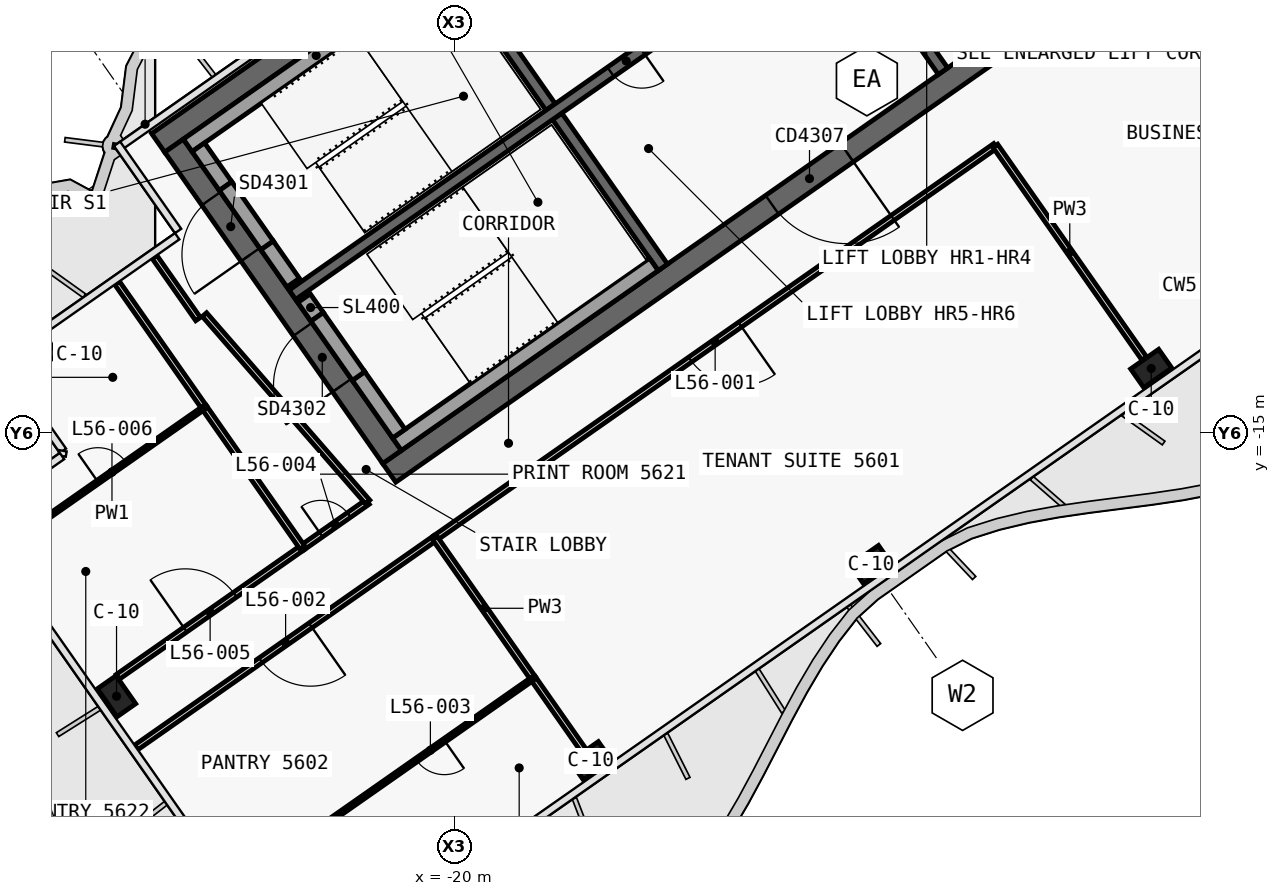
"""IFC4 building model, lengths in metres.
Left out: names, types, materials, properties, quantities, classifications, styles, units other than length and angle.
Written with IfcOpenShell. Run it as: python <this file> out.ifc"""

import sys

from ifc_helpers import new_model, si_unit, direction, frame, frame_2d, origin, origin_2d, place, context, subcontext, project, spatial, polyline, rectangle, outline, extrude, element, fill, save


model = new_model("IFC4")
c1 = context("Model", 3, precision=1e-05, world=origin(), true_north=direction((0.0, 1.0)))
c2 = subcontext(c1, "Body", "Model", "MODEL_VIEW")
j1 = project(units=[si_unit("LENGTHUNIT", "METRE"), si_unit("PLANEANGLEUNIT", "RADIAN")], contexts=[c1])
p1 = place(None, origin())
s1 = spatial("IfcSite", under=j1, at=p1, CompositionType="ELEMENT")
p2 = place(p1, origin())
s2 = spatial("IfcBuilding", under=s1, at=p2, CompositionType="ELEMENT")
p3 = place(p2, frame((0.0, 0.0, 241.0)))
s3 = spatial("IfcBuildingStorey", under=s2, at=p3, CompositionType="ELEMENT", Elevation=241.0)
p4 = place(p3, frame((-0.028, 12.066, 0.0), z_axis=(0.0, 0.0, 1.0), x_axis=(-0.819151382952, -0.573577380837, 0.0)))
e1 = element("IfcWall", 1, at=p4, inside=s3, PredefinedType="SHEAR", context=c2, shape_type="SweptSolid", body=[
    extrude(outline(polyline([(33.898, 0.3), (0.42, 0.3), (0.0, -0.3), (33.898, -0.3), (33.898, 0.3)])), origin(), (0.0, 0.0, 1.0), 3.9),
])
p5 = place(p3, frame((-0.028, -0.874, 0.0), z_axis=(0.0, 0.0, 1.0), x_axis=(-0.819150035022, -0.573579305871, 0.0)))
e2 = element("IfcWall", 2, at=p5, inside=s3, PredefinedType="SHEAR", context=c2, shape_type="SweptSolid", body=[
    extrude(outline(polyline([(26.476, 0.3), (0.42, 0.3), (0.0, -0.3), (26.476, -0.3), (26.476, 0.3)])), origin(), (0.0, 0.0, 1.0), 3.9),
])
p6 = place(p5, frame((2.976, 0.0, 0.0)))
e3 = element("IfcOpeningElement", 3, at=p6, cuts=e2, PredefinedType="OPENING", context=c2, shape_type="SweptSolid", body=[
    extrude(rectangle(XDim=2.4, YDim=2.1, at=frame_2d((1.2, 1.05))), frame((0.0, 0.31, 0.0), z_axis=(0.0, -1.0, 0.0), x_axis=(1.0, 0.0, 0.0)), (0.0, 0.0, 1.0), 0.62),
])
p7 = place(p5, frame((11.776, 0.0, 0.0)))
e4 = element("IfcOpeningElement", 4, at=p7, cuts=e2, PredefinedType="OPENING", context=c2, shape_type="SweptSolid", body=[
    extrude(rectangle(XDim=2.4, YDim=2.1, at=frame_2d((1.2, 1.05))), frame((0.0, 0.31, 0.0), z_axis=(0.0, -1.0, 0.0), x_axis=(1.0, 0.0, 0.0)), (0.0, 0.0, 1.0), 0.62),
])
p8 = place(p3, frame((-21.642, -15.642, 0.0), z_axis=(0.0, 0.0, 1.0), x_axis=(-0.573586866468, 0.819144740944, 0.0)))
e5 = element("IfcWall", 5, at=p8, inside=s3, PredefinedType="SHEAR", context=c2, shape_type="SweptSolid", body=[
    extrude(outline(polyline([(0.0, 0.3), (0.0, -0.3), (10.0, -0.3), (10.0, 0.3), (0.0, 0.3)])), origin(), (0.0, 0.0, 1.0), 3.9),
])
p9 = place(p8, frame((6.5, 0.0, 0.0)))
e6 = element("IfcOpeningElement", 6, at=p9, cuts=e5, PredefinedType="OPENING", context=c2, shape_type="SweptSolid", body=[
    extrude(rectangle(XDim=1.8, YDim=2.1, at=frame_2d((0.9, 1.05))), frame((0.0, 0.31, 0.0), z_axis=(0.0, -1.0, 0.0), x_axis=(1.0, 0.0, 0.0)), (0.0, 0.0, 1.0), 0.62),
])
p10 = place(p8, frame((2.3, 0.0, 0.0)))
e7 = element("IfcOpeningElement", 7, at=p10, cuts=e5, PredefinedType="OPENING", context=c2, shape_type="SweptSolid", body=[
    extrude(rectangle(XDim=1.8, YDim=2.1, at=frame_2d((0.9, 1.05))), frame((0.0, 0.31, 0.0), z_axis=(0.0, -1.0, 0.0), x_axis=(1.0, 0.0, 0.0)), (0.0, 0.0, 1.0), 0.62),
])
p11 = place(p3, frame((-7.143, -5.49, 0.0), z_axis=(0.0, 0.0, 1.0), x_axis=(-0.573617744349, 0.819123118565, 0.0)))
e8 = element("IfcWall", 8, at=p11, inside=s3, PredefinedType="SHEAR", context=c2, shape_type="SweptSolid", body=[
    extrude(outline(polyline([(4.85, 0.15), (0.0, 0.15), (0.0, -0.15), (4.85, -0.15), (4.85, 0.15)])), origin(), (0.0, 0.0, 1.0), 3.9),
])
p12 = place(p3, frame((-14.515, -10.652, 0.0), z_axis=(0.0, 0.0, 1.0), x_axis=(-0.573560315113, 0.819163332265, 0.0)))
e9 = element("IfcWall", 9, at=p12, inside=s3, PredefinedType="SHEAR", context=c2, shape_type="SweptSolid", body=[
    extrude(outline(polyline([(4.85, 0.15), (0.0, 0.15), (0.0, -0.15), (4.85, -0.15), (4.85, 0.15)])), origin(), (0.0, 0.0, 1.0), 3.9),
])
p13 = place(p3, frame((-17.469, -6.433, 0.0), z_axis=(0.0, 0.0, 1.0), x_axis=(-0.573594092424, 0.81913968109, 0.0)))
e10 = element("IfcWall", 10, at=p13, inside=s3, PredefinedType="SHEAR", context=c2, shape_type="SweptSolid", body=[
    extrude(outline(polyline([(4.85, -0.15), (4.85, 0.15), (0.0, 0.15), (0.0, -0.15), (4.85, -0.15)])), origin(), (0.0, 0.0, 1.0), 3.9),
])
p14 = place(p3, frame((-2.638, 3.768, 0.0), z_axis=(0.0, 0.0, 1.0), x_axis=(-0.819155014212, -0.573572194837, 0.0)))
e11 = element("IfcWall", 11, at=p14, inside=s3, PredefinedType="SHEAR", context=c2, shape_type="SweptSolid", body=[
    extrude(outline(polyline([(26.4, 0.15), (0.0, 0.15), (0.0, -0.15), (26.4, -0.15), (26.4, 0.15)])), origin(), (0.0, 0.0, 1.0), 3.9),
])
p15 = place(p14, frame((1.169, 0.0, 0.0)))
e12 = element("IfcOpeningElement", 12, at=p15, cuts=e11, PredefinedType="OPENING", context=c2, shape_type="SweptSolid", body=[
    extrude(rectangle(XDim=1.1, YDim=2.1, at=frame_2d((0.55, 1.05))), frame((0.0, 0.16, 0.0), z_axis=(0.0, -1.0, 0.0), x_axis=(1.0, 0.0, 0.0)), (0.0, 0.0, 1.0), 0.32),
])
p16 = place(p14, frame((3.206, 0.0, 0.0)))
e13 = element("IfcOpeningElement", 13, at=p16, cuts=e11, PredefinedType="OPENING", context=c2, shape_type="SweptSolid", body=[
    extrude(rectangle(XDim=1.1, YDim=2.1, at=frame_2d((0.55, 1.05))), frame((0.0, 0.16, 0.0), z_axis=(0.0, -1.0, 0.0), x_axis=(1.0, 0.0, 0.0)), (0.0, 0.0, 1.0), 0.32),
])
p17 = place(p14, frame((5.244, 0.0, 0.0)))
e14 = element("IfcOpeningElement", 14, at=p17, cuts=e11, PredefinedType="OPENING", context=c2, shape_type="SweptSolid", body=[
    extrude(rectangle(XDim=1.1, YDim=2.1, at=frame_2d((0.55, 1.05))), frame((0.0, 0.16, 0.0), z_axis=(0.0, -1.0, 0.0), x_axis=(1.0, 0.0, 0.0)), (0.0, 0.0, 1.0), 0.32),
])
p18 = place(p14, frame((7.281, 0.0, 0.0)))
e15 = element("IfcOpeningElement", 15, at=p18, cuts=e11, PredefinedType="OPENING", context=c2, shape_type="SweptSolid", body=[
    extrude(rectangle(XDim=1.1, YDim=2.1, at=frame_2d((0.55, 1.05))), frame((0.0, 0.16, 0.0), z_axis=(0.0, -1.0, 0.0), x_axis=(1.0, 0.0, 0.0)), (0.0, 0.0, 1.0), 0.32),
])
p19 = place(p14, frame((9.688, 0.0, 0.0)))
e16 = element("IfcOpeningElement", 16, at=p19, cuts=e11, PredefinedType="OPENING", context=c2, shape_type="SweptSolid", body=[
    extrude(rectangle(XDim=1.1, YDim=2.1, at=frame_2d((0.55, 1.05))), frame((0.0, 0.16, 0.0), z_axis=(0.0, -1.0, 0.0), x_axis=(1.0, 0.0, 0.0)), (0.0, 0.0, 1.0), 0.32),
])
p20 = place(p14, frame((11.863, 0.0, 0.0)))
e17 = element("IfcOpeningElement", 17, at=p20, cuts=e11, PredefinedType="OPENING", context=c2, shape_type="SweptSolid", body=[
    extrude(rectangle(XDim=1.1, YDim=2.1, at=frame_2d((0.55, 1.05))), frame((0.0, 0.16, 0.0), z_axis=(0.0, -1.0, 0.0), x_axis=(1.0, 0.0, 0.0)), (0.0, 0.0, 1.0), 0.32),
])
p21 = place(p14, frame((15.175, 0.0, 0.0)))
e18 = element("IfcOpeningElement", 18, at=p21, cuts=e11, PredefinedType="OPENING", context=c2, shape_type="SweptSolid", body=[
    extrude(rectangle(XDim=1.0, YDim=2.1, at=frame_2d((0.5, 1.05))), frame((0.0, 0.16, 0.0), z_axis=(0.0, -1.0, 0.0), x_axis=(1.0, 0.0, 0.0)), (0.0, 0.0, 1.0), 0.32),
])
for number, where, z_axis, x_axis in (
    (19, (-1.665, -13.313, 0.0), (0.0, 0.0, 1.0), (-0.819, -0.574, 0.0)),
    (20, (-9.038, -18.475, 0.0), (0.0, 0.0, 1.0), (-0.819, -0.574, 0.0)),
    (21, (-16.41, -23.637, 0.0), (0.0, 0.0, 1.0), (-0.819, -0.574, 0.0)),
    (22, (-30.969, -12.956, 0.0), (0.0, 0.0, 1.0), (-0.819, -0.574, 0.0)),
    (23, (-28.891, -21.939, 0.0), (0.0, 0.0, 1.0), (-0.574, 0.819, 0.0)),
):
    element("IfcColumn", number, at=place(p3, frame(where, z_axis=z_axis, x_axis=x_axis)), inside=s3, PredefinedType="COLUMN", context=c2, shape_type="SweptSolid", body=[
        extrude(rectangle(XDim=0.9, YDim=0.6, at=origin_2d()), origin(), (0.0, 0.0, 1.0), 3.9),
    ])
p22 = place(p3, frame((-20.259, -2.71, 0.0), z_axis=(0.0, 0.0, 1.0), x_axis=(-0.81914849389, -0.573581506813, 0.0)))
e24 = element("IfcWall", 24, at=p22, inside=s3, PredefinedType="SOLIDWALL", context=c2, shape_type="SweptSolid", body=[
    extrude(rectangle(XDim=8.25, YDim=0.4, at=frame_2d((4.125, 0.0))), origin(), (0.0, 0.0, 1.0), 3.62),
])
p23 = place(p3, frame((-24.244, -11.055, 0.0), z_axis=(0.0, 0.0, 1.0), x_axis=(-0.573571582932, 0.819155442668, 0.0)))
e25 = element("IfcWall", 25, at=p23, inside=s3, PredefinedType="SOLIDWALL", context=c2, shape_type="SweptSolid", body=[
    extrude(rectangle(XDim=1.2, YDim=0.4, at=frame_2d((0.6, 0.0))), origin(), (0.0, 0.0, 1.0), 3.62),
])
p24 = place(p3, frame((-26.022, -8.515, 0.0), z_axis=(0.0, 0.0, 1.0), x_axis=(-0.573619628835, 0.819121798889, 0.0)))
e26 = element("IfcWall", 26, at=p24, inside=s3, PredefinedType="SOLIDWALL", context=c2, shape_type="SweptSolid", body=[
    extrude(rectangle(XDim=1.25, YDim=0.4, at=frame_2d((0.625, 0.0))), origin(), (0.0, 0.0, 1.0), 3.62),
])
p25 = place(p3, frame((-24.932, -10.072, 2.15), z_axis=(0.0, 0.0, 1.0), x_axis=(-0.573591692345, 0.819141361715, 0.0)))
e27 = element("IfcWall", 27, at=p25, inside=s3, PredefinedType="SOLIDWALL", context=c2, shape_type="SweptSolid", body=[
    extrude(rectangle(XDim=1.9, YDim=0.4, at=frame_2d((0.95, 0.0))), origin(), (0.0, 0.0, 1.0), 1.47),
])
p26 = place(p3, frame((-14.753, -10.574, 0.0), z_axis=(0.0, 0.0, 1.0), x_axis=(-0.819158229677, -0.573567602601, 0.0)))
e28 = element("IfcWall", 28, at=p26, inside=s3, PredefinedType="SOLIDWALL", context=c2, shape_type="SweptSolid", body=[
    extrude(rectangle(XDim=8.25, YDim=0.4, at=frame_2d((4.125, 0.0))), origin(), (0.0, 0.0, 1.0), 3.62),
])
p27 = place(p3, frame((-21.462, -15.028, 0.0), z_axis=(0.0, 0.0, 1.0), x_axis=(-0.573559770908, 0.819163713305, 0.0)))
e29 = element("IfcWall", 29, at=p27, inside=s3, PredefinedType="SOLIDWALL", context=c2, shape_type="SweptSolid", body=[
    extrude(rectangle(XDim=1.85, YDim=0.4, at=frame_2d((0.925, 0.0))), origin(), (0.0, 0.0, 1.0), 3.62),
])
p28 = place(p3, frame((-23.613, -11.956, 0.0), z_axis=(0.0, 0.0, 1.0), x_axis=(-0.573435029941, 0.819251039936, 0.0)))
e30 = element("IfcWall", 30, at=p28, inside=s3, PredefinedType="SOLIDWALL", context=c2, shape_type="SweptSolid", body=[
    extrude(rectangle(XDim=0.6, YDim=0.4, at=frame_2d((0.3, 0.0))), origin(), (0.0, 0.0, 1.0), 3.62),
])
p29 = place(p3, frame((-22.523, -13.512, 2.15), z_axis=(0.0, 0.0, 1.0), x_axis=(-0.573591692345, 0.819141361715, 0.0)))
e31 = element("IfcWall", 31, at=p29, inside=s3, PredefinedType="SOLIDWALL", context=c2, shape_type="SweptSolid", body=[
    extrude(rectangle(XDim=1.9, YDim=0.4, at=frame_2d((0.95, 0.0))), origin(), (0.0, 0.0, 1.0), 1.47),
])
p30 = place(p3, frame((-24.002, -18.028, 0.0), z_axis=(0.0, 0.0, 1.0), x_axis=(0.819144473797, 0.573587247982, 0.0)))
e32 = element("IfcWall", 32, at=p30, inside=s3, PredefinedType="PARTITIONING", context=c2, shape_type="SweptSolid", body=[
    extrude(rectangle(XDim=2.099, YDim=0.15, at=frame_2d((1.049, 0.0))), origin(), (0.0, 0.0, 1.0), 3.62),
])
p31 = place(p30, frame((0.599, 0.0, 0.0)))
e33 = element("IfcOpeningElement", 33, at=p31, cuts=e32, PredefinedType="OPENING", context=c2, shape_type="SweptSolid", body=[
    extrude(rectangle(XDim=0.9, YDim=2.1, at=frame_2d((0.45, 1.05))), frame((0.0, 0.085, 0.0), z_axis=(0.0, -1.0, 0.0), x_axis=(1.0, 0.0, 0.0)), (0.0, 0.0, 1.0), 0.17),
])
p32 = place(p3, frame((-28.858, -21.428, 0.0), z_axis=(0.0, 0.0, 1.0), x_axis=(0.819137166599, 0.573597683308, 0.0)))
e34 = element("IfcWall", 34, at=p32, inside=s3, PredefinedType="PARTITIONING", context=c2, shape_type="SweptSolid", body=[
    extrude(rectangle(XDim=5.932, YDim=0.15, at=frame_2d((2.966, 0.0))), origin(), (0.0, 0.0, 1.0), 3.05),
])
p33 = place(p32, frame((2.166, 0.0, 0.0)))
e35 = element("IfcOpeningElement", 35, at=p33, cuts=e34, PredefinedType="OPENING", context=c2, shape_type="SweptSolid", body=[
    extrude(rectangle(XDim=1.6, YDim=2.1, at=frame_2d((0.8, 1.05))), frame((0.0, 0.085, 0.0), z_axis=(0.0, -1.0, 0.0), x_axis=(1.0, 0.0, 0.0)), (0.0, 0.0, 1.0), 0.17),
])
p34 = place(p3, frame((-5.766, -7.456, 0.0), z_axis=(0.0, 0.0, 1.0), x_axis=(-0.819153544995, -0.573574293115, 0.0)))
e36 = element("IfcWall", 36, at=p34, inside=s3, PredefinedType="PARTITIONING", context=c2, shape_type="SweptSolid", body=[
    extrude(rectangle(XDim=18.002, YDim=0.15, at=frame_2d((9.001, 0.0))), origin(), (0.0, 0.0, 1.0), 3.05),
])
p35 = place(p34, frame((8.201, 0.0, 0.0)))
e37 = element("IfcOpeningElement", 37, at=p35, cuts=e36, PredefinedType="OPENING", context=c2, shape_type="SweptSolid", body=[
    extrude(rectangle(XDim=1.6, YDim=2.1, at=frame_2d((0.8, 1.05))), frame((0.0, 0.085, 0.0), z_axis=(0.0, -1.0, 0.0), x_axis=(1.0, 0.0, 0.0)), (0.0, 0.0, 1.0), 0.17),
])
p36 = place(p3, frame((-20.51, -17.779, 0.0), z_axis=(0.0, 0.0, 1.0), x_axis=(-0.819147101588, -0.573583495196, 0.0)))
e38 = element("IfcWall", 38, at=p36, inside=s3, PredefinedType="PARTITIONING", context=c2, shape_type="SweptSolid", body=[
    extrude(rectangle(XDim=9.602, YDim=0.15, at=frame_2d((4.801, 0.0))), origin(), (0.0, 0.0, 1.0), 3.0),
])
p37 = place(p36, frame((4.001, 0.0, 0.0)))
e39 = element("IfcOpeningElement", 39, at=p37, cuts=e38, PredefinedType="OPENING", context=c2, shape_type="SweptSolid", body=[
    extrude(rectangle(XDim=1.6, YDim=2.1, at=frame_2d((0.8, 1.05))), frame((0.0, 0.085, 0.0), z_axis=(0.0, -1.0, 0.0), x_axis=(1.0, 0.0, 0.0)), (0.0, 0.0, 1.0), 0.17),
])
p38 = place(p3, frame((-1.849, -13.051, 0.0), z_axis=(0.0, 0.0, 1.0), x_axis=(-0.57357985571, 0.819149650018, 0.0)))
e40 = element("IfcWall", 40, at=p38, inside=s3, PredefinedType="PARTITIONING", context=c2, shape_type="SweptSolid", body=[
    extrude(rectangle(XDim=6.832, YDim=0.15, at=frame_2d((3.416, 0.0))), origin(), (0.0, 0.0, 1.0), 3.05),
])
p39 = place(p3, frame((-26.746, -12.014, 0.0), z_axis=(0.0, 0.0, 1.0), x_axis=(-0.573568836472, 0.819157365729, 0.0)))
e41 = element("IfcWall", 41, at=p39, inside=s3, PredefinedType="PARTITIONING", context=c2, shape_type="SweptSolid", body=[
    extrude(rectangle(XDim=2.0, YDim=0.15, at=frame_2d((1.0, 0.0))), origin(), (0.0, 0.0, 1.0), 3.05),
])
p40 = place(p3, frame((-22.284, -16.826, 0.0), z_axis=(0.0, 0.0, 1.0), x_axis=(-0.656758142177, 0.754101281449, 0.0)))
e42 = element("IfcWall", 42, at=p40, inside=s3, PredefinedType="PARTITIONING", context=c2, shape_type="SweptSolid", body=[
    extrude(rectangle(XDim=6.539, YDim=0.15, at=frame_2d((3.269, 0.0))), origin(), (0.0, 0.0, 1.0), 3.62),
])
p41 = place(p3, frame((-26.582, -14.341, 0.0), z_axis=(0.0, 0.0, 1.0), x_axis=(-0.573593387921, 0.81914017441, 0.0)))
e43 = element("IfcWall", 43, at=p41, inside=s3, PredefinedType="PARTITIONING", context=c2, shape_type="SweptSolid", body=[
    extrude(rectangle(XDim=4.001, YDim=0.15, at=frame_2d((2.0, 0.0))), origin(), (0.0, 0.0, 1.0), 3.05),
])
p42 = place(p3, frame((-24.001, -18.026, 0.0), z_axis=(0.0, 0.0, 1.0), x_axis=(-0.573589723117, 0.819142740634, 0.0)))
e44 = element("IfcWall", 44, at=p42, inside=s3, PredefinedType="PARTITIONING", context=c2, shape_type="SweptSolid", body=[
    extrude(rectangle(XDim=4.502, YDim=0.15, at=frame_2d((2.251, 0.0))), origin(), (0.0, 0.0, 1.0), 3.62),
])
p43 = place(p3, frame((-31.44, -17.741, 0.0), z_axis=(0.0, 0.0, 1.0), x_axis=(0.8191390677, 0.573594968395, 0.0)))
e45 = element("IfcWall", 45, at=p43, inside=s3, PredefinedType="PARTITIONING", context=c2, shape_type="SweptSolid", body=[
    extrude(rectangle(XDim=5.93, YDim=0.1, at=frame_2d((2.965, 0.0))), origin(), (0.0, 0.0, 1.0), 3.05),
])
p44 = place(p43, frame((2.515, 0.0, 0.0)))
e46 = element("IfcOpeningElement", 46, at=p44, cuts=e45, PredefinedType="OPENING", context=c2, shape_type="SweptSolid", body=[
    extrude(rectangle(XDim=0.9, YDim=2.1, at=frame_2d((0.45, 1.05))), frame((0.0, 0.06, 0.0), z_axis=(0.0, -1.0, 0.0), x_axis=(1.0, 0.0, 0.0)), (0.0, 0.0, 1.0), 0.12),
])
p45 = place(p3, frame((-16.594, -23.375, 0.0), z_axis=(0.0, 0.0, 1.0), x_axis=(-0.57362400197, 0.819118736426, 0.0)))
e47 = element("IfcWall", 47, at=p45, inside=s3, PredefinedType="PARTITIONING", context=c2, shape_type="SweptSolid", body=[
    extrude(rectangle(XDim=2.331, YDim=0.15, at=frame_2d((1.166, 0.0))), origin(), (0.0, 0.0, 1.0), 3.05),
])
p46 = place(p3, frame((-17.929, -21.468, 0.0), z_axis=(0.0, 0.0, 1.0), x_axis=(-0.573553333433, 0.819168220641, 0.0)))
e48 = element("IfcWall", 48, at=p46, inside=s3, PredefinedType="PARTITIONING", context=c2, shape_type="SweptSolid", body=[
    extrude(rectangle(XDim=4.502, YDim=0.15, at=frame_2d((2.251, 0.0))), origin(), (0.0, 0.0, 1.0), 3.05),
])
p47 = place(p3, frame((-17.929, -21.467, 0.0), z_axis=(0.0, 0.0, 1.0), x_axis=(-0.819158922237, -0.573566613498, 0.0)))
e49 = element("IfcWall", 49, at=p47, inside=s3, PredefinedType="PARTITIONING", context=c2, shape_type="SweptSolid", body=[
    extrude(rectangle(XDim=6.6, YDim=0.1, at=frame_2d((3.3, 0.0))), origin(), (0.0, 0.0, 1.0), 3.05),
])
p48 = place(p47, frame((2.85, 0.0, 0.0)))
e50 = element("IfcOpeningElement", 50, at=p48, cuts=e49, PredefinedType="OPENING", context=c2, shape_type="SweptSolid", body=[
    extrude(rectangle(XDim=0.9, YDim=2.1, at=frame_2d((0.45, 1.05))), frame((0.0, 0.06, 0.0), z_axis=(0.0, -1.0, 0.0), x_axis=(1.0, 0.0, 0.0)), (0.0, 0.0, 1.0), 0.12),
])
p49 = place(p21, origin())
e51 = element("IfcDoor", 51, at=p49, inside=s3, OperationType="SINGLE_SWING_RIGHT", PredefinedType="DOOR", context=c2, shape_type="SweptSolid", body=[
    extrude(rectangle(XDim=1.0, YDim=2.1, at=frame_2d((0.5, 1.05))), frame((0.0, 0.025, 0.0), z_axis=(0.0, -1.0, 0.0), x_axis=(1.0, 0.0, 0.0)), (0.0, 0.0, 1.0), 0.05),
])
fill(e18, e51)
p50 = place(p7, origin())
e52 = element("IfcDoor", 52, at=p50, inside=s3, OperationType="DOUBLE_DOOR_SINGLE_SWING", PredefinedType="DOOR", context=c2, shape_type="SweptSolid", body=[
    extrude(rectangle(XDim=2.4, YDim=2.1, at=frame_2d((1.2, 1.05))), frame((0.0, 0.025, 0.0), z_axis=(0.0, -1.0, 0.0), x_axis=(1.0, 0.0, 0.0)), (0.0, 0.0, 1.0), 0.05),
])
fill(e4, e52)
p51 = place(p9, origin())
e53 = element("IfcDoor", 53, at=p51, inside=s3, OperationType="DOUBLE_DOOR_SINGLE_SWING", PredefinedType="DOOR", context=c2, shape_type="SweptSolid", body=[
    extrude(rectangle(XDim=1.8, YDim=2.1, at=frame_2d((0.9, 1.05))), frame((0.0, 0.025, 0.0), z_axis=(0.0, -1.0, 0.0), x_axis=(1.0, 0.0, 0.0)), (0.0, 0.0, 1.0), 0.05),
])
fill(e6, e53)
p52 = place(p10, origin())
e54 = element("IfcDoor", 54, at=p52, inside=s3, OperationType="DOUBLE_DOOR_SINGLE_SWING", PredefinedType="DOOR", context=c2, shape_type="SweptSolid", body=[
    extrude(rectangle(XDim=1.8, YDim=2.1, at=frame_2d((0.9, 1.05))), frame((0.0, 0.025, 0.0), z_axis=(0.0, -1.0, 0.0), x_axis=(1.0, 0.0, 0.0)), (0.0, 0.0, 1.0), 0.05),
])
fill(e7, e54)
p53 = place(p35, origin())
e55 = element("IfcDoor", 55, at=p53, inside=s3, OperationType="DOUBLE_DOOR_SINGLE_SWING", PredefinedType="DOOR", context=c2, shape_type="SweptSolid", body=[
    extrude(rectangle(XDim=1.6, YDim=2.1, at=frame_2d((0.8, 1.05))), frame((0.0, 0.025, 0.0), z_axis=(0.0, -1.0, 0.0), x_axis=(1.0, 0.0, 0.0)), (0.0, 0.0, 1.0), 0.05),
])
fill(e37, e55)
p54 = place(p37, origin())
e56 = element("IfcDoor", 56, at=p54, inside=s3, OperationType="DOUBLE_DOOR_SINGLE_SWING", PredefinedType="DOOR", context=c2, shape_type="SweptSolid", body=[
    extrude(rectangle(XDim=1.6, YDim=2.1, at=frame_2d((0.8, 1.05))), frame((0.0, 0.025, 0.0), z_axis=(0.0, -1.0, 0.0), x_axis=(1.0, 0.0, 0.0)), (0.0, 0.0, 1.0), 0.05),
])
fill(e39, e56)
p55 = place(p48, origin())
e57 = element("IfcDoor", 57, at=p55, inside=s3, OperationType="SINGLE_SWING_RIGHT", PredefinedType="DOOR", context=c2, shape_type="SweptSolid", body=[
    extrude(rectangle(XDim=0.9, YDim=2.1, at=frame_2d((0.45, 1.05))), frame((0.0, 0.025, 0.0), z_axis=(0.0, -1.0, 0.0), x_axis=(1.0, 0.0, 0.0)), (0.0, 0.0, 1.0), 0.05),
])
fill(e50, e57)
p56 = place(p31, origin())
e58 = element("IfcDoor", 58, at=p56, inside=s3, OperationType="SINGLE_SWING_RIGHT", PredefinedType="DOOR", context=c2, shape_type="SweptSolid", body=[
    extrude(rectangle(XDim=0.9, YDim=2.1, at=frame_2d((0.45, 1.05))), frame((0.0, 0.025, 0.0), z_axis=(0.0, -1.0, 0.0), x_axis=(1.0, 0.0, 0.0)), (0.0, 0.0, 1.0), 0.05),
])
fill(e33, e58)
p57 = place(p33, origin())
e59 = element("IfcDoor", 59, at=p57, inside=s3, OperationType="DOUBLE_DOOR_SINGLE_SWING", PredefinedType="DOOR", context=c2, shape_type="SweptSolid", body=[
    extrude(rectangle(XDim=1.6, YDim=2.1, at=frame_2d((0.8, 1.05))), frame((0.0, 0.025, 0.0), z_axis=(0.0, -1.0, 0.0), x_axis=(1.0, 0.0, 0.0)), (0.0, 0.0, 1.0), 0.05),
])
fill(e35, e59)
p58 = place(p44, origin())
e60 = element("IfcDoor", 60, at=p58, inside=s3, OperationType="SINGLE_SWING_RIGHT", PredefinedType="DOOR", context=c2, shape_type="SweptSolid", body=[
    extrude(rectangle(XDim=0.9, YDim=2.1, at=frame_2d((0.45, 1.05))), frame((0.0, 0.025, 0.0), z_axis=(0.0, -1.0, 0.0), x_axis=(1.0, 0.0, 0.0)), (0.0, 0.0, 1.0), 0.05),
])
fill(e46, e60)
save(model, sys.argv[1])
